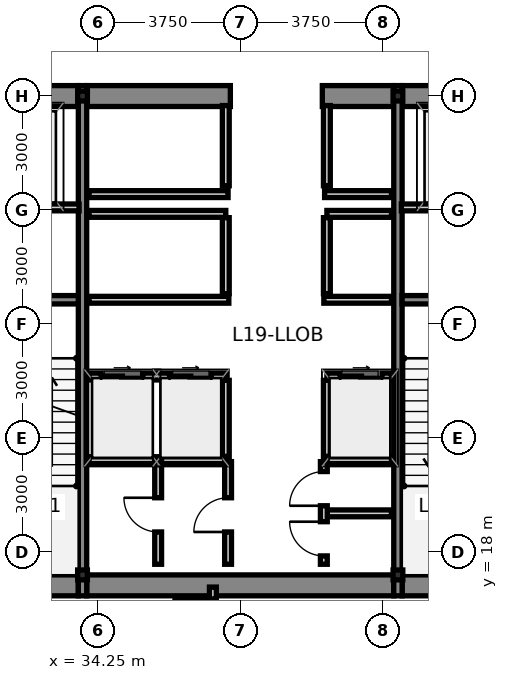
"""IFC4 building model, lengths in metres.
Left out: names, types, materials, properties, quantities, classifications, styles, units other than length and angle.
Written with IfcOpenShell. Run it as: python <this file> out.ifc"""

import sys

from ifc_helpers import new_model, si_unit, direction, frame, frame_2d, origin, origin_2d, place, context, subcontext, project, spatial, rectangle, i_section, extrude, source, transform, mapped, element, fill, save


model = new_model("IFC4")
c1 = context("Model", 3, precision=1e-05, world=origin(), true_north=direction((0.0, 1.0)))
c2 = subcontext(c1, "Body", "Model", "MODEL_VIEW")
j1 = project(units=[si_unit("LENGTHUNIT", "METRE"), si_unit("PLANEANGLEUNIT", "RADIAN")], contexts=[c1])
p1 = place(None, origin())
s1 = spatial("IfcSite", under=j1, at=p1, CompositionType="ELEMENT")
p2 = place(p1, origin())
s2 = spatial("IfcBuilding", under=s1, at=p2, CompositionType="ELEMENT")
p3 = place(p2, frame((0.0, 0.0, 75.05)))
s3 = spatial("IfcBuildingStorey", under=s2, at=p3, CompositionType="ELEMENT", Elevation=75.05)
m1 = source(origin(), c2, "Body", "SweptSolid", [
    extrude(i_section(OverallWidth=0.256, OverallDepth=0.26, WebThickness=0.01, FlangeThickness=0.017, at=origin_2d()), origin(), (0.0, 0.0, 1.0), 4.8),
])
for number, where, z_axis, x_axis in (
    (1, (33.85, 17.4, 0.0), (0.0, 0.0, 1.0), (1.0, 0.0, 0.0)),
    (2, (42.15, 17.4, 0.0), (0.0, 0.0, 1.0), (1.0, 0.0, 0.0)),
    (3, (33.85, 30.0, 0.0), (0.0, 0.0, 1.0), (1.0, 0.0, 0.0)),
    (4, (42.15, 30.0, 0.0), (0.0, 0.0, 1.0), (1.0, 0.0, 0.0)),
):
    element("IfcColumn", number, at=place(p3, frame(where, z_axis=z_axis, x_axis=x_axis)), inside=s3, PredefinedType="COLUMN", context=c2, shape_type="MappedRepresentation", body=[
        mapped(m1, transform((0.0, 0.0, 0.0), scale=1.0)),
    ])
p4 = place(p3, frame((30.84, 17.125, 0.0), z_axis=(0.0, 0.0, 1.0), x_axis=(1.0, 0.0, 0.0)))
e5 = element("IfcWall", 5, at=p4, inside=s3, PredefinedType="SHEAR", context=c2, shape_type="SweptSolid", body=[
    extrude(rectangle(XDim=2.9, YDim=0.55, at=frame_2d((1.45, 0.0))), origin(), (0.0, 0.0, 1.0), 4.8),
])
p5 = place(p3, frame((33.96, 17.125, 0.0), z_axis=(0.0, 0.0, 1.0), x_axis=(1.0, 0.0, 0.0)))
e6 = element("IfcWall", 6, at=p5, inside=s3, PredefinedType="SHEAR", context=c2, shape_type="SweptSolid", body=[
    extrude(rectangle(XDim=8.08, YDim=0.55, at=frame_2d((4.04, 0.0))), origin(), (0.0, 0.0, 1.0), 4.8),
])
for number, where, z_axis, x_axis in (
    (7, (42.26, 17.125, 0.0), (0.0, 0.0, 1.0), (1.0, 0.0, 0.0)),
    (8, (30.84, 30.0, 0.0), (0.0, 0.0, 1.0), (1.0, 0.0, 0.0)),
):
    element("IfcWall", number, at=place(p3, frame(where, z_axis=z_axis, x_axis=x_axis)), inside=s3, PredefinedType="SHEAR", context=c2, shape_type="SweptSolid", body=[
        extrude(rectangle(XDim=2.9, YDim=0.55, at=frame_2d((1.45, 0.0))), origin(), (0.0, 0.0, 1.0), 4.8),
    ])
p6 = place(p3, frame((33.96, 30.0, 0.0), z_axis=(0.0, 0.0, 1.0), x_axis=(1.0, 0.0, 0.0)))
e9 = element("IfcWall", 9, at=p6, inside=s3, PredefinedType="SHEAR", context=c2, shape_type="SweptSolid", body=[
    extrude(rectangle(XDim=3.78, YDim=0.55, at=frame_2d((1.89, 0.0))), origin(), (0.0, 0.0, 1.0), 4.8),
])
p7 = place(p3, frame((40.16, 30.0, 0.0), z_axis=(0.0, 0.0, 1.0), x_axis=(1.0, 0.0, 0.0)))
e10 = element("IfcWall", 10, at=p7, inside=s3, PredefinedType="SHEAR", context=c2, shape_type="SweptSolid", body=[
    extrude(rectangle(XDim=1.88, YDim=0.55, at=frame_2d((0.94, 0.0))), origin(), (0.0, 0.0, 1.0), 4.8),
])
p8 = place(p3, frame((42.26, 30.0, 0.0), z_axis=(0.0, 0.0, 1.0), x_axis=(1.0, 0.0, 0.0)))
e11 = element("IfcWall", 11, at=p8, inside=s3, PredefinedType="SHEAR", context=c2, shape_type="SweptSolid", body=[
    extrude(rectangle(XDim=2.9, YDim=0.55, at=frame_2d((1.45, 0.0))), origin(), (0.0, 0.0, 1.0), 4.8),
])
for number, where, z_axis, x_axis in (
    (12, (33.85, 16.85, 0.0), (0.0, 0.0, 1.0), (0.0, 1.0, 0.0)),
    (13, (42.15, 16.85, 0.0), (0.0, 0.0, 1.0), (0.0, 1.0, 0.0)),
):
    element("IfcWall", number, at=place(p3, frame(where, z_axis=z_axis, x_axis=x_axis)), inside=s3, PredefinedType="SHEAR", context=c2, shape_type="SweptSolid", body=[
        extrude(rectangle(XDim=13.425, YDim=0.22, at=frame_2d((6.712, 0.0))), origin(), (0.0, 0.0, 1.0), 4.8),
    ])
for number, where, z_axis, x_axis in (
    (14, (30.84, 24.64, 0.0), (0.0, 0.0, 1.0), (1.0, 0.0, 0.0)),
    (15, (42.26, 24.64, 0.0), (0.0, 0.0, 1.0), (1.0, 0.0, 0.0)),
):
    element("IfcWall", number, at=place(p3, frame(where, z_axis=z_axis, x_axis=x_axis)), inside=s3, PredefinedType="SHEAR", context=c2, shape_type="SweptSolid", body=[
        extrude(rectangle(XDim=2.9, YDim=0.22, at=frame_2d((1.45, 0.0))), origin(), (0.0, 0.0, 1.0), 4.8),
    ])
p9 = place(p3, frame((34.02, 22.62, 0.0), z_axis=(0.0, 0.0, 1.0), x_axis=(1.0, 0.0, 0.0)))
e16 = element("IfcWall", 16, at=p9, inside=s3, PredefinedType="PARTITIONING", context=c2, shape_type="SweptSolid", body=[
    extrude(rectangle(XDim=3.6, YDim=0.18, at=frame_2d((1.8, 0.0))), origin(), (0.0, 0.0, 1.0), 4.55),
])
p10 = place(p9, frame((0.32, 0.0, 0.0)))
e17 = element("IfcOpeningElement", 17, at=p10, cuts=e16, PredefinedType="OPENING", context=c2, shape_type="SweptSolid", body=[
    extrude(rectangle(XDim=1.1, YDim=2.2, at=frame_2d((0.55, 1.1))), frame((0.0, 0.102, 0.0), z_axis=(0.0, -1.0, 0.0), x_axis=(1.0, 0.0, 0.0)), (0.0, 0.0, 1.0), 0.204),
])
p11 = place(p9, frame((2.12, 0.0, 0.0)))
e18 = element("IfcOpeningElement", 18, at=p11, cuts=e16, PredefinedType="OPENING", context=c2, shape_type="SweptSolid", body=[
    extrude(rectangle(XDim=1.1, YDim=2.2, at=frame_2d((0.55, 1.1))), frame((0.0, 0.102, 0.0), z_axis=(0.0, -1.0, 0.0), x_axis=(1.0, 0.0, 0.0)), (0.0, 0.0, 1.0), 0.204),
])
p12 = place(p3, frame((40.28, 22.62, 0.0), z_axis=(0.0, 0.0, 1.0), x_axis=(1.0, 0.0, 0.0)))
e19 = element("IfcWall", 19, at=p12, inside=s3, PredefinedType="PARTITIONING", context=c2, shape_type="SweptSolid", body=[
    extrude(rectangle(XDim=1.7, YDim=0.18, at=frame_2d((0.85, 0.0))), origin(), (0.0, 0.0, 1.0), 4.55),
])
p13 = place(p12, frame((0.35, 0.0, 0.0)))
e20 = element("IfcOpeningElement", 20, at=p13, cuts=e19, PredefinedType="OPENING", context=c2, shape_type="SweptSolid", body=[
    extrude(rectangle(XDim=1.1, YDim=2.2, at=frame_2d((0.55, 1.1))), frame((0.0, 0.102, 0.0), z_axis=(0.0, -1.0, 0.0), x_axis=(1.0, 0.0, 0.0)), (0.0, 0.0, 1.0), 0.204),
])
for number, where, z_axis, x_axis in (
    (21, (37.62, 20.52, 0.0), (0.0, 0.0, 1.0), (0.0, 1.0, 0.0)),
    (22, (40.28, 20.52, 0.0), (0.0, 0.0, 1.0), (0.0, 1.0, 0.0)),
):
    element("IfcWall", number, at=place(p3, frame(where, z_axis=z_axis, x_axis=x_axis)), inside=s3, PredefinedType="PARTITIONING", context=c2, shape_type="SweptSolid", body=[
        extrude(rectangle(XDim=2.0, YDim=0.18, at=frame_2d((1.0, 0.0))), origin(), (0.0, 0.0, 1.0), 4.55),
    ])
p14 = place(p3, frame((34.02, 26.9, 0.0), z_axis=(0.0, 0.0, 1.0), x_axis=(1.0, 0.0, 0.0)))
e23 = element("IfcWall", 23, at=p14, inside=s3, PredefinedType="PARTITIONING", context=c2, shape_type="SweptSolid", body=[
    extrude(rectangle(XDim=3.6, YDim=0.18, at=frame_2d((1.8, 0.0))), origin(), (0.0, 0.0, 1.0), 4.55),
])
p15 = place(p3, frame((40.28, 26.9, 0.0), z_axis=(0.0, 0.0, 1.0), x_axis=(1.0, 0.0, 0.0)))
e24 = element("IfcWall", 24, at=p15, inside=s3, PredefinedType="PARTITIONING", context=c2, shape_type="SweptSolid", body=[
    extrude(rectangle(XDim=1.7, YDim=0.18, at=frame_2d((0.85, 0.0))), origin(), (0.0, 0.0, 1.0), 4.55),
])
for number, where, z_axis, x_axis in (
    (25, (37.62, 24.8, 0.0), (0.0, 0.0, 1.0), (0.0, 1.0, 0.0)),
    (26, (40.28, 24.8, 0.0), (0.0, 0.0, 1.0), (0.0, 1.0, 0.0)),
):
    element("IfcWall", number, at=place(p3, frame(where, z_axis=z_axis, x_axis=x_axis)), inside=s3, PredefinedType="PARTITIONING", context=c2, shape_type="SweptSolid", body=[
        extrude(rectangle(XDim=2.0, YDim=0.18, at=frame_2d((1.0, 0.0))), origin(), (0.0, 0.0, 1.0), 4.55),
    ])
p16 = place(p3, frame((34.02, 24.64, 0.0), z_axis=(0.0, 0.0, 1.0), x_axis=(1.0, 0.0, 0.0)))
e27 = element("IfcWall", 27, at=p16, inside=s3, PredefinedType="PARTITIONING", context=c2, shape_type="SweptSolid", body=[
    extrude(rectangle(XDim=3.68, YDim=0.18, at=frame_2d((1.84, 0.0))), origin(), (0.0, 0.0, 1.0), 4.55),
])
p17 = place(p3, frame((40.2, 24.64, 0.0), z_axis=(0.0, 0.0, 1.0), x_axis=(1.0, 0.0, 0.0)))
e28 = element("IfcWall", 28, at=p17, inside=s3, PredefinedType="PARTITIONING", context=c2, shape_type="SweptSolid", body=[
    extrude(rectangle(XDim=1.78, YDim=0.18, at=frame_2d((0.89, 0.0))), origin(), (0.0, 0.0, 1.0), 4.55),
])
p18 = place(p3, frame((34.02, 27.42, 0.0), z_axis=(0.0, 0.0, 1.0), x_axis=(1.0, 0.0, 0.0)))
e29 = element("IfcWall", 29, at=p18, inside=s3, PredefinedType="PARTITIONING", context=c2, shape_type="SweptSolid", body=[
    extrude(rectangle(XDim=3.66, YDim=0.18, at=frame_2d((1.83, 0.0))), origin(), (0.0, 0.0, 1.0), 4.55),
])
p19 = place(p3, frame((40.22, 27.42, 0.0), z_axis=(0.0, 0.0, 1.0), x_axis=(1.0, 0.0, 0.0)))
e30 = element("IfcWall", 30, at=p19, inside=s3, PredefinedType="PARTITIONING", context=c2, shape_type="SweptSolid", body=[
    extrude(rectangle(XDim=1.76, YDim=0.18, at=frame_2d((0.88, 0.0))), origin(), (0.0, 0.0, 1.0), 4.55),
])
for number, where, z_axis, x_axis in (
    (31, (37.62, 27.64, 0.0), (0.0, 0.0, 1.0), (0.0, 1.0, 0.0)),
    (32, (40.28, 27.64, 0.0), (0.0, 0.0, 1.0), (0.0, 1.0, 0.0)),
):
    element("IfcWall", number, at=place(p3, frame(where, z_axis=z_axis, x_axis=x_axis)), inside=s3, PredefinedType="PARTITIONING", context=c2, shape_type="SweptSolid", body=[
        extrude(rectangle(XDim=2.11, YDim=0.18, at=frame_2d((1.055, 0.0))), origin(), (0.0, 0.0, 1.0), 4.55),
    ])
for number, where, z_axis, x_axis in (
    (33, (30.86, 27.07, 0.0), (0.0, 0.0, 1.0), (1.0, 0.0, 0.0)),
    (34, (42.24, 27.07, 0.0), (0.0, 0.0, 1.0), (1.0, 0.0, 0.0)),
):
    element("IfcWall", number, at=place(p3, frame(where, z_axis=z_axis, x_axis=x_axis)), inside=s3, PredefinedType="PARTITIONING", context=c2, shape_type="SweptSolid", body=[
        extrude(rectangle(XDim=2.9, YDim=0.18, at=frame_2d((1.45, 0.0))), origin(), (0.0, 0.0, 1.0), 4.55),
    ])
p20 = place(p3, frame((34.02, 20.42, 0.0), z_axis=(0.0, 0.0, 1.0), x_axis=(1.0, 0.0, 0.0)))
e35 = element("IfcWall", 35, at=p20, inside=s3, PredefinedType="PARTITIONING", context=c2, shape_type="SweptSolid", body=[
    extrude(rectangle(XDim=3.64, YDim=0.18, at=frame_2d((1.82, 0.0))), origin(), (0.0, 0.0, 1.0), 4.55),
])
p21 = place(p3, frame((40.22, 20.42, 0.0), z_axis=(0.0, 0.0, 1.0), x_axis=(1.0, 0.0, 0.0)))
e36 = element("IfcWall", 36, at=p21, inside=s3, PredefinedType="PARTITIONING", context=c2, shape_type="SweptSolid", body=[
    extrude(rectangle(XDim=1.76, YDim=0.18, at=frame_2d((0.88, 0.0))), origin(), (0.0, 0.0, 1.0), 4.55),
])
p22 = place(p3, frame((35.84, 17.68, 0.0), z_axis=(0.0, 0.0, 1.0), x_axis=(0.0, 1.0, 0.0)))
e37 = element("IfcWall", 37, at=p22, inside=s3, PredefinedType="PARTITIONING", context=c2, shape_type="SweptSolid", body=[
    extrude(rectangle(XDim=2.7, YDim=0.18, at=frame_2d((1.35, 0.0))), origin(), (0.0, 0.0, 1.0), 4.55),
])
p23 = place(p22, frame((0.85, 0.0, 0.0)))
e38 = element("IfcOpeningElement", 38, at=p23, cuts=e37, PredefinedType="OPENING", context=c2, shape_type="SweptSolid", body=[
    extrude(rectangle(XDim=0.9, YDim=2.1, at=frame_2d((0.45, 1.05))), frame((0.0, 0.102, 0.0), z_axis=(0.0, -1.0, 0.0), x_axis=(1.0, 0.0, 0.0)), (0.0, 0.0, 1.0), 0.204),
])
p24 = place(p3, frame((37.68, 17.68, 0.0), z_axis=(0.0, 0.0, 1.0), x_axis=(0.0, 1.0, 0.0)))
e39 = element("IfcWall", 39, at=p24, inside=s3, PredefinedType="PARTITIONING", context=c2, shape_type="SweptSolid", body=[
    extrude(rectangle(XDim=2.7, YDim=0.18, at=frame_2d((1.35, 0.0))), origin(), (0.0, 0.0, 1.0), 4.55),
])
p25 = place(p24, frame((0.85, 0.0, 0.0)))
e40 = element("IfcOpeningElement", 40, at=p25, cuts=e39, PredefinedType="OPENING", context=c2, shape_type="SweptSolid", body=[
    extrude(rectangle(XDim=0.9, YDim=2.1, at=frame_2d((0.45, 1.05))), frame((0.0, 0.102, 0.0), z_axis=(0.0, -1.0, 0.0), x_axis=(1.0, 0.0, 0.0)), (0.0, 0.0, 1.0), 0.204),
])
p26 = place(p3, frame((40.28, 19.02, 0.0), z_axis=(0.0, 0.0, 1.0), x_axis=(1.0, 0.0, 0.0)))
e41 = element("IfcWall", 41, at=p26, inside=s3, PredefinedType="PARTITIONING", context=c2, shape_type="SweptSolid", body=[
    extrude(rectangle(XDim=1.7, YDim=0.18, at=frame_2d((0.85, 0.0))), origin(), (0.0, 0.0, 1.0), 4.55),
])
p27 = place(p3, frame((40.2, 17.68, 0.0), z_axis=(0.0, 0.0, 1.0), x_axis=(0.0, 1.0, 0.0)))
e42 = element("IfcWall", 42, at=p27, inside=s3, PredefinedType="PARTITIONING", context=c2, shape_type="SweptSolid", body=[
    extrude(rectangle(XDim=2.7, YDim=0.18, at=frame_2d((1.35, 0.0))), origin(), (0.0, 0.0, 1.0), 4.55),
])
p28 = place(p27, frame((0.22, 0.0, 0.0)))
e43 = element("IfcOpeningElement", 43, at=p28, cuts=e42, PredefinedType="OPENING", context=c2, shape_type="SweptSolid", body=[
    extrude(rectangle(XDim=0.9, YDim=2.1, at=frame_2d((0.45, 1.05))), frame((0.0, 0.102, 0.0), z_axis=(0.0, -1.0, 0.0), x_axis=(1.0, 0.0, 0.0)), (0.0, 0.0, 1.0), 0.204),
])
p29 = place(p27, frame((1.54, 0.0, 0.0)))
e44 = element("IfcOpeningElement", 44, at=p29, cuts=e42, PredefinedType="OPENING", context=c2, shape_type="SweptSolid", body=[
    extrude(rectangle(XDim=0.9, YDim=2.1, at=frame_2d((0.45, 1.05))), frame((0.0, 0.102, 0.0), z_axis=(0.0, -1.0, 0.0), x_axis=(1.0, 0.0, 0.0)), (0.0, 0.0, 1.0), 0.204),
])
p30 = place(p3, frame((37.28, 15.465, 0.0), z_axis=(0.0, 0.0, 1.0), x_axis=(0.0, 1.0, 0.0)))
e45 = element("IfcWall", 45, at=p30, inside=s3, PredefinedType="PARTITIONING", context=c2, shape_type="SweptSolid", body=[
    extrude(rectangle(XDim=1.615, YDim=0.18, at=frame_2d((0.808, 0.0))), origin(), (0.0, 0.0, 1.0), 4.55),
])
p31 = place(p30, frame((0.25, 0.0, 0.0)))
e46 = element("IfcOpeningElement", 46, at=p31, cuts=e45, PredefinedType="OPENING", context=c2, shape_type="SweptSolid", body=[
    extrude(rectangle(XDim=1.05, YDim=2.15, at=frame_2d((0.525, 1.075))), frame((0.0, 0.102, 0.0), z_axis=(0.0, -1.0, 0.0), x_axis=(1.0, 0.0, 0.0)), (0.0, 0.0, 1.0), 0.204),
])
p32 = place(p10, origin())
e47 = element("IfcDoor", 47, at=p32, inside=s3, OperationType="SLIDING_TO_LEFT", PredefinedType="DOOR", context=c2, shape_type="SweptSolid", body=[
    extrude(rectangle(XDim=1.1, YDim=2.2, at=frame_2d((0.55, 1.1))), frame((0.0, 0.025, 0.0), z_axis=(0.0, -1.0, 0.0), x_axis=(1.0, 0.0, 0.0)), (0.0, 0.0, 1.0), 0.05),
])
fill(e17, e47)
p33 = place(p11, origin())
e48 = element("IfcDoor", 48, at=p33, inside=s3, OperationType="SLIDING_TO_RIGHT", PredefinedType="DOOR", context=c2, shape_type="SweptSolid", body=[
    extrude(rectangle(XDim=1.1, YDim=2.2, at=frame_2d((0.55, 1.1))), frame((0.0, 0.025, 0.0), z_axis=(0.0, -1.0, 0.0), x_axis=(1.0, 0.0, 0.0)), (0.0, 0.0, 1.0), 0.05),
])
fill(e18, e48)
p34 = place(p13, origin())
e49 = element("IfcDoor", 49, at=p34, inside=s3, OperationType="SLIDING_TO_LEFT", PredefinedType="DOOR", context=c2, shape_type="SweptSolid", body=[
    extrude(rectangle(XDim=1.1, YDim=2.2, at=frame_2d((0.55, 1.1))), frame((0.0, 0.025, 0.0), z_axis=(0.0, -1.0, 0.0), x_axis=(1.0, 0.0, 0.0)), (0.0, 0.0, 1.0), 0.05),
])
fill(e20, e49)
p35 = place(p23, origin())
e50 = element("IfcDoor", 50, at=p35, inside=s3, OperationType="SINGLE_SWING_RIGHT", PredefinedType="DOOR", context=c2, shape_type="SweptSolid", body=[
    extrude(rectangle(XDim=0.9, YDim=2.1, at=frame_2d((0.45, 1.05))), frame((0.0, 0.025, 0.0), z_axis=(0.0, -1.0, 0.0), x_axis=(1.0, 0.0, 0.0)), (0.0, 0.0, 1.0), 0.05),
])
fill(e38, e50)
p36 = place(p25, origin())
e51 = element("IfcDoor", 51, at=p36, inside=s3, OperationType="SINGLE_SWING_LEFT", PredefinedType="DOOR", context=c2, shape_type="SweptSolid", body=[
    extrude(rectangle(XDim=0.9, YDim=2.1, at=frame_2d((0.45, 1.05))), frame((0.0, 0.025, 0.0), z_axis=(0.0, -1.0, 0.0), x_axis=(1.0, 0.0, 0.0)), (0.0, 0.0, 1.0), 0.05),
])
fill(e40, e51)
p37 = place(p28, origin())
e52 = element("IfcDoor", 52, at=p37, inside=s3, OperationType="SINGLE_SWING_RIGHT", PredefinedType="DOOR", context=c2, shape_type="SweptSolid", body=[
    extrude(rectangle(XDim=0.9, YDim=2.1, at=frame_2d((0.45, 1.05))), frame((0.0, 0.025, 0.0), z_axis=(0.0, -1.0, 0.0), x_axis=(1.0, 0.0, 0.0)), (0.0, 0.0, 1.0), 0.05),
])
fill(e43, e52)
p38 = place(p29, origin())
e53 = element("IfcDoor", 53, at=p38, inside=s3, OperationType="SINGLE_SWING_LEFT", PredefinedType="DOOR", context=c2, shape_type="SweptSolid", body=[
    extrude(rectangle(XDim=0.9, YDim=2.1, at=frame_2d((0.45, 1.05))), frame((0.0, 0.025, 0.0), z_axis=(0.0, -1.0, 0.0), x_axis=(1.0, 0.0, 0.0)), (0.0, 0.0, 1.0), 0.05),
])
fill(e44, e53)
p39 = place(p31, origin())
e54 = element("IfcDoor", 54, at=p39, inside=s3, OperationType="SINGLE_SWING_RIGHT", PredefinedType="DOOR", context=c2, shape_type="SweptSolid", body=[
    extrude(rectangle(XDim=1.05, YDim=2.15, at=frame_2d((0.525, 1.075))), frame((0.0, 0.025, 0.0), z_axis=(0.0, -1.0, 0.0), x_axis=(1.0, 0.0, 0.0)), (0.0, 0.0, 1.0), 0.05),
])
fill(e46, e54)
save(model, sys.argv[1])
